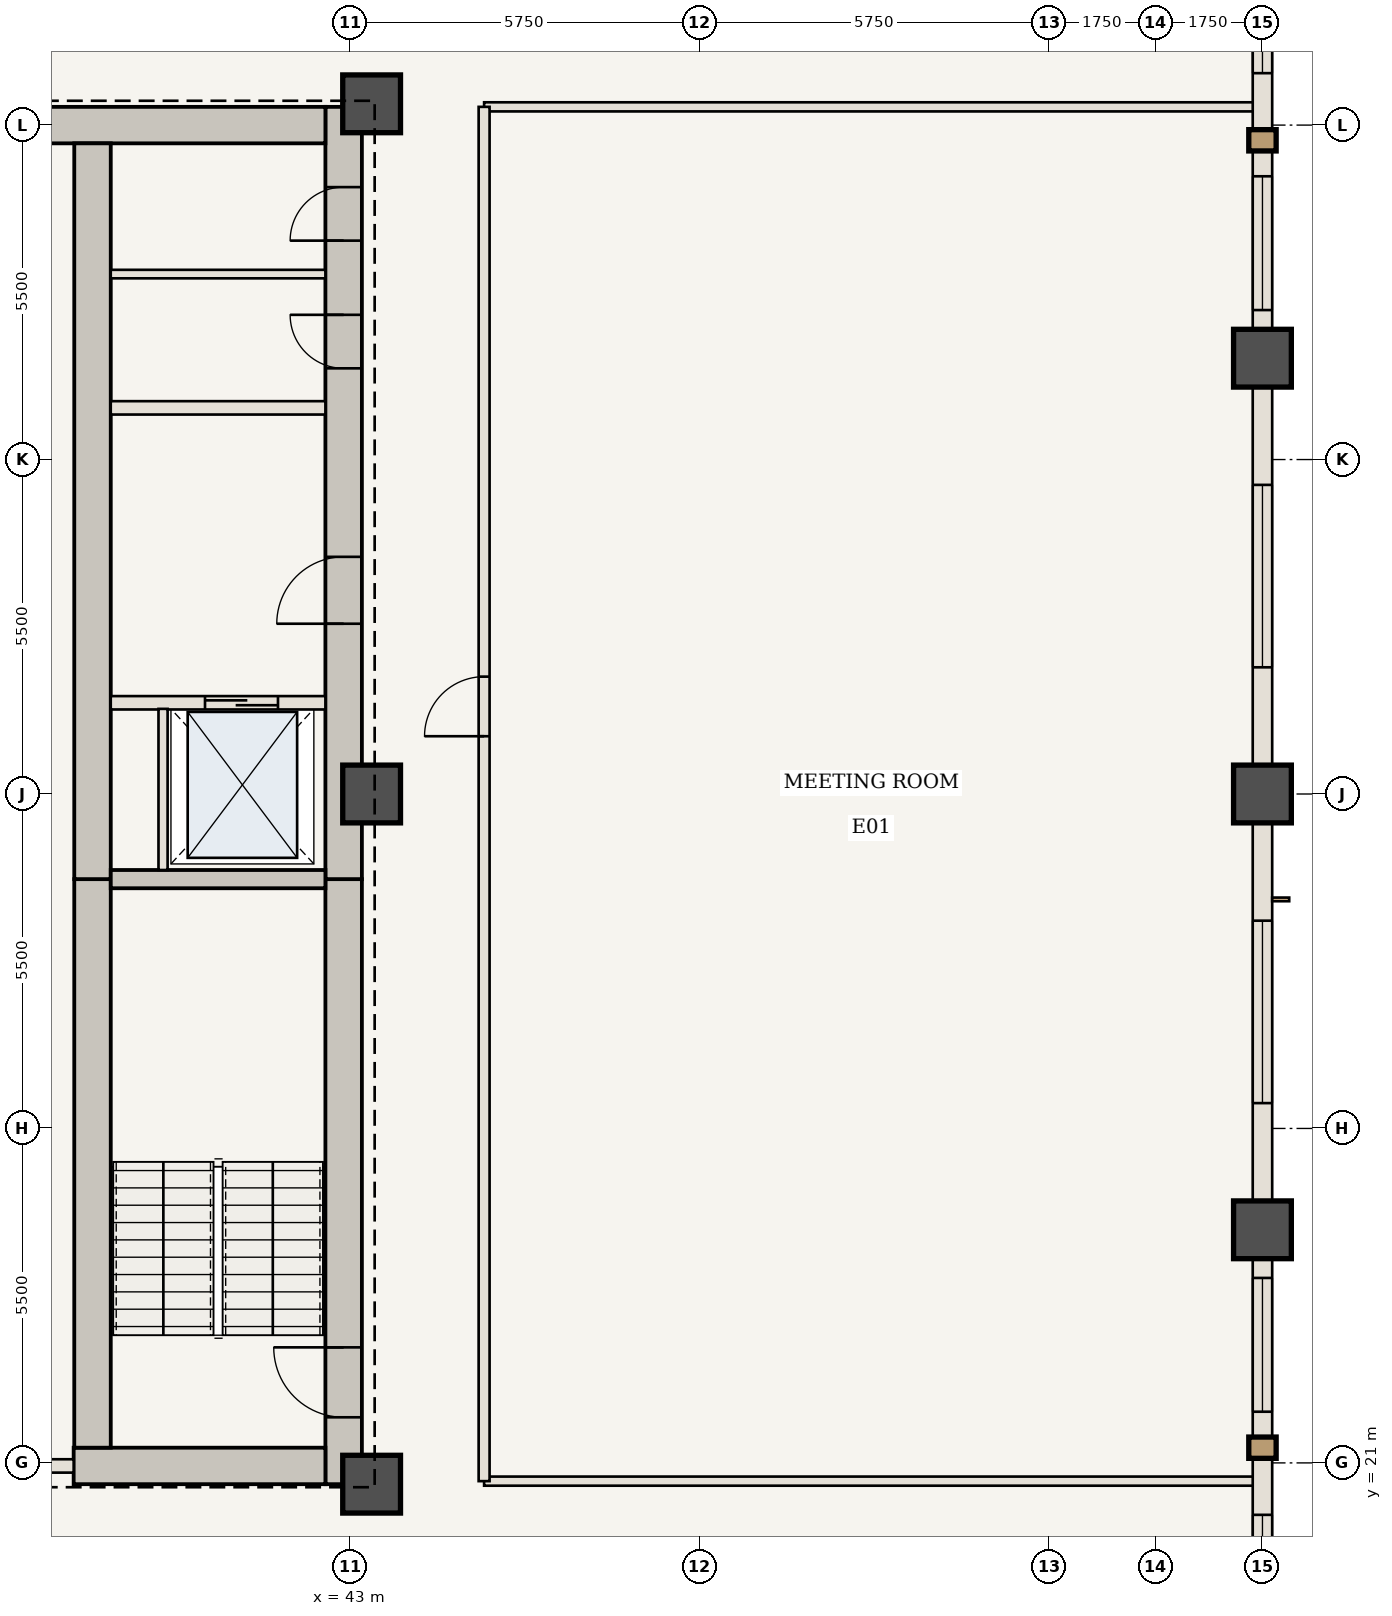
"""IFC4 building model, lengths in metres.
Left out: names, types, materials, properties, quantities, classifications, styles, units other than length and angle.
Written with IfcOpenShell. Run it as: python <this file> out.ifc"""

import sys

from ifc_helpers import new_model, si_unit, direction, frame, frame_2d, origin, origin_2d, place, context, subcontext, project, spatial, rectangle, extrude, element, fill, save


model = new_model("IFC4")
c1 = context("Model", 3, precision=1e-05, world=origin(), true_north=direction((0.0, 1.0)))
c2 = subcontext(c1, "Body", "Model", "MODEL_VIEW")
j1 = project(units=[si_unit("LENGTHUNIT", "METRE"), si_unit("PLANEANGLEUNIT", "RADIAN")], contexts=[c1])
p1 = place(None, origin())
s1 = spatial("IfcSite", under=j1, at=p1, CompositionType="ELEMENT")
p2 = place(p1, origin())
s2 = spatial("IfcBuilding", under=s1, at=p2, CompositionType="ELEMENT")
p3 = place(p2, frame((0.0, 0.0, 156.8)))
s3 = spatial("IfcBuildingStorey", under=s2, at=p3, CompositionType="ELEMENT", Elevation=156.8)
p4 = place(p3, frame((42.89, 20.65, 0.0), z_axis=(0.0, 0.0, 1.0), x_axis=(0.0, 1.0, 0.0)))
e1 = element("IfcWall", 1, at=p4, inside=s3, PredefinedType="SHEAR", context=c2, shape_type="SweptSolid", body=[
    extrude(rectangle(XDim=9.95, YDim=0.6, at=frame_2d((4.975, 0.0))), origin(), (0.0, 0.0, 1.0), 3.85),
])
p5 = place(p4, frame((1.1, 0.0, 0.0)))
e2 = element("IfcOpeningElement", 2, at=p5, cuts=e1, PredefinedType="OPENING", context=c2, shape_type="SweptSolid", body=[
    extrude(rectangle(XDim=1.15, YDim=2.15, at=frame_2d((0.575, 1.075))), frame((0.0, 0.31, 0.0), z_axis=(0.0, -1.0, 0.0), x_axis=(1.0, 0.0, 0.0)), (0.0, 0.0, 1.0), 0.62),
])
p6 = place(p3, frame((42.89, 30.6, 0.0), z_axis=(0.0, 0.0, 1.0), x_axis=(0.0, 1.0, 0.0)))
e3 = element("IfcWall", 3, at=p6, inside=s3, PredefinedType="SHEAR", context=c2, shape_type="SweptSolid", body=[
    extrude(rectangle(XDim=12.7, YDim=0.6, at=frame_2d((6.35, 0.0))), origin(), (0.0, 0.0, 1.0), 3.85),
])
p7 = place(p6, frame((4.2, 0.0, 0.0)))
e4 = element("IfcOpeningElement", 4, at=p7, cuts=e3, PredefinedType="OPENING", context=c2, shape_type="SweptSolid", body=[
    extrude(rectangle(XDim=1.1, YDim=2.15, at=frame_2d((0.55, 1.075))), frame((0.0, 0.31, 0.0), z_axis=(0.0, -1.0, 0.0), x_axis=(1.0, 0.0, 0.0)), (0.0, 0.0, 1.0), 0.62),
])
p8 = place(p6, frame((8.4, 0.0, 0.0)))
e5 = element("IfcOpeningElement", 5, at=p8, cuts=e3, PredefinedType="OPENING", context=c2, shape_type="SweptSolid", body=[
    extrude(rectangle(XDim=0.88, YDim=2.1, at=frame_2d((0.44, 1.05))), frame((0.0, 0.31, 0.0), z_axis=(0.0, -1.0, 0.0), x_axis=(1.0, 0.0, 0.0)), (0.0, 0.0, 1.0), 0.62),
])
p9 = place(p6, frame((10.5, 0.0, 0.0)))
e6 = element("IfcOpeningElement", 6, at=p9, cuts=e3, PredefinedType="OPENING", context=c2, shape_type="SweptSolid", body=[
    extrude(rectangle(XDim=0.88, YDim=2.1, at=frame_2d((0.44, 1.05))), frame((0.0, 0.31, 0.0), z_axis=(0.0, -1.0, 0.0), x_axis=(1.0, 0.0, 0.0)), (0.0, 0.0, 1.0), 0.62),
])
p10 = place(p3, frame((38.45, 20.95, 0.0), z_axis=(0.0, 0.0, 1.0), x_axis=(1.0, 0.0, 0.0)))
e7 = element("IfcWall", 7, at=p10, inside=s3, PredefinedType="SHEAR", context=c2, shape_type="SweptSolid", body=[
    extrude(rectangle(XDim=4.14, YDim=0.6, at=frame_2d((2.07, 0.0))), origin(), (0.0, 0.0, 1.0), 3.85),
])
p11 = place(p3, frame((37.75, 43.0, 0.0), z_axis=(0.0, 0.0, 1.0), x_axis=(1.0, 0.0, 0.0)))
e8 = element("IfcWall", 8, at=p11, inside=s3, PredefinedType="SHEAR", context=c2, shape_type="SweptSolid", body=[
    extrude(rectangle(XDim=4.84, YDim=0.6, at=frame_2d((2.42, 0.0))), origin(), (0.0, 0.0, 1.0), 3.85),
])
p12 = place(p3, frame((38.76, 21.25, 0.0), z_axis=(0.0, 0.0, 1.0), x_axis=(0.0, 1.0, 0.0)))
e9 = element("IfcWall", 9, at=p12, inside=s3, PredefinedType="SHEAR", context=c2, shape_type="SweptSolid", body=[
    extrude(rectangle(XDim=9.35, YDim=0.6, at=frame_2d((4.675, 0.0))), origin(), (0.0, 0.0, 1.0), 3.85),
])
p13 = place(p3, frame((38.76, 30.6, 0.0), z_axis=(0.0, 0.0, 1.0), x_axis=(0.0, 1.0, 0.0)))
e10 = element("IfcWall", 10, at=p13, inside=s3, PredefinedType="SHEAR", context=c2, shape_type="SweptSolid", body=[
    extrude(rectangle(XDim=12.1, YDim=0.6, at=frame_2d((6.05, 0.0))), origin(), (0.0, 0.0, 1.0), 3.85),
])
for number, where, z_axis, x_axis in (
    (11, (43.35, 20.65, 0.0), (0.0, 0.0, 1.0), (1.0, 0.0, 0.0)),
    (12, (43.35, 32.0, 0.0), (0.0, 0.0, 1.0), (1.0, 0.0, 0.0)),
    (13, (43.35, 43.35, 0.0), (0.0, 0.0, 1.0), (1.0, 0.0, 0.0)),
    (14, (58.0, 24.833, 0.0), (0.0, 0.0, 1.0), (1.0, 0.0, 0.0)),
    (15, (58.0, 32.0, 0.0), (0.0, 0.0, 1.0), (1.0, 0.0, 0.0)),
    (16, (58.0, 39.167, 0.0), (0.0, 0.0, 1.0), (1.0, 0.0, 0.0)),
):
    element("IfcColumn", number, at=place(p3, frame(where, z_axis=z_axis, x_axis=x_axis)), inside=s3, PredefinedType="COLUMN", context=c2, shape_type="SweptSolid", body=[
        extrude(rectangle(XDim=0.95, YDim=0.95, at=origin_2d()), origin(), (0.0, 0.0, 1.0), 3.85),
    ])
p14 = place(p3, frame((39.06, 30.6, 0.0), z_axis=(0.0, 0.0, 1.0), x_axis=(1.0, 0.0, 0.0)))
e17 = element("IfcWall", 17, at=p14, inside=s3, PredefinedType="SHEAR", context=c2, shape_type="SweptSolid", body=[
    extrude(rectangle(XDim=3.53, YDim=0.3, at=frame_2d((1.765, 0.0))), origin(), (0.0, 0.0, 1.0), 3.685),
])
p15 = place(p3, frame((39.06, 33.5, 0.0), z_axis=(0.0, 0.0, 1.0), x_axis=(1.0, 0.0, 0.0)))
e18 = element("IfcWall", 18, at=p15, inside=s3, PredefinedType="STANDARD", context=c2, shape_type="SweptSolid", body=[
    extrude(rectangle(XDim=3.53, YDim=0.22, at=frame_2d((1.765, 0.0))), origin(), (0.0, 0.0, 1.0), 3.685),
])
p16 = place(p15, frame((1.55, 0.0, 0.0)))
e19 = element("IfcOpeningElement", 19, at=p16, cuts=e18, PredefinedType="OPENING", context=c2, shape_type="SweptSolid", body=[
    extrude(rectangle(XDim=1.2, YDim=2.2, at=frame_2d((0.6, 1.1))), frame((0.0, 0.12, 0.0), z_axis=(0.0, -1.0, 0.0), x_axis=(1.0, 0.0, 0.0)), (0.0, 0.0, 1.0), 0.24),
])
p17 = place(p3, frame((39.92, 30.75, 0.0), z_axis=(0.0, 0.0, 1.0), x_axis=(0.0, 1.0, 0.0)))
e20 = element("IfcWall", 20, at=p17, inside=s3, PredefinedType="STANDARD", context=c2, shape_type="SweptSolid", body=[
    extrude(rectangle(XDim=2.65, YDim=0.15, at=frame_2d((1.325, 0.0))), origin(), (0.0, 0.0, 1.0), 3.685),
])
p18 = place(p3, frame((39.06, 38.35, 0.0), z_axis=(0.0, 0.0, 1.0), x_axis=(1.0, 0.0, 0.0)))
e21 = element("IfcWall", 21, at=p18, inside=s3, PredefinedType="STANDARD", context=c2, shape_type="SweptSolid", body=[
    extrude(rectangle(XDim=3.53, YDim=0.22, at=frame_2d((1.765, 0.0))), origin(), (0.0, 0.0, 1.0), 3.685),
])
p19 = place(p3, frame((39.06, 40.55, 0.0), z_axis=(0.0, 0.0, 1.0), x_axis=(1.0, 0.0, 0.0)))
e22 = element("IfcWall", 22, at=p19, inside=s3, PredefinedType="STANDARD", context=c2, shape_type="SweptSolid", body=[
    extrude(rectangle(XDim=3.53, YDim=0.14, at=frame_2d((1.765, 0.0))), origin(), (0.0, 0.0, 1.0), 3.685),
])
p20 = place(p3, frame((35.15, 20.95, 0.0), z_axis=(0.0, 0.0, 1.0), x_axis=(1.0, 0.0, 0.0)))
e23 = element("IfcWall", 23, at=p20, inside=s3, PredefinedType="STANDARD", context=c2, shape_type="SweptSolid", body=[
    extrude(rectangle(XDim=3.3, YDim=0.22, at=frame_2d((1.65, 0.0))), origin(), (0.0, 0.0, 1.0), 3.685),
])
p21 = place(p20, frame((1.1, 0.0, 0.0)))
e24 = element("IfcOpeningElement", 24, at=p21, cuts=e23, PredefinedType="OPENING", context=c2, shape_type="SweptSolid", body=[
    extrude(rectangle(XDim=1.1, YDim=2.15, at=frame_2d((0.55, 1.075))), frame((0.0, 0.12, 0.0), z_axis=(0.0, -1.0, 0.0), x_axis=(1.0, 0.0, 0.0)), (0.0, 0.0, 1.0), 0.24),
])
for number, where, z_axis, x_axis in (
    (25, (45.2, 20.7, 0.0), (0.0, 0.0, 1.0), (1.0, 0.0, 0.0)),
    (26, (45.2, 43.3, 0.0), (0.0, 0.0, 1.0), (1.0, 0.0, 0.0)),
):
    element("IfcWall", number, at=place(p3, frame(where, z_axis=z_axis, x_axis=x_axis)), inside=s3, PredefinedType="STANDARD", context=c2, shape_type="SweptSolid", body=[
        extrude(rectangle(XDim=12.74, YDim=0.15, at=frame_2d((6.37, 0.0))), origin(), (0.0, 0.0, 1.0), 3.065),
    ])
p22 = place(p3, frame((45.2, 20.7, 0.0), z_axis=(0.0, 0.0, 1.0), x_axis=(0.0, 1.0, 0.0)))
e27 = element("IfcWall", 27, at=p22, inside=s3, PredefinedType="STANDARD", context=c2, shape_type="SweptSolid", body=[
    extrude(rectangle(XDim=22.6, YDim=0.18, at=frame_2d((11.3, 0.0))), origin(), (0.0, 0.0, 1.0), 3.685),
])
p23 = place(p22, frame((12.25, 0.0, 0.0)))
e28 = element("IfcOpeningElement", 28, at=p23, cuts=e27, PredefinedType="OPENING", context=c2, shape_type="SweptSolid", body=[
    extrude(rectangle(XDim=0.98, YDim=2.2, at=frame_2d((0.49, 1.1))), frame((0.0, 0.1, 0.0), z_axis=(0.0, -1.0, 0.0), x_axis=(1.0, 0.0, 0.0)), (0.0, 0.0, 1.0), 0.2),
])
p24 = place(p3, frame((58.0, 24.833, 0.0), z_axis=(0.0, 0.0, 1.0), x_axis=(0.0, -1.0, 0.0)))
e29 = element("IfcWall", 29, at=p24, inside=s3, PredefinedType="USERDEFINED", context=c2, shape_type="SweptSolid", body=[
    extrude(rectangle(XDim=7.167, YDim=0.32, at=frame_2d((3.583, 0.0))), origin(), (0.0, 0.0, 1.0), 2.885),
])
p25 = place(p24, frame((0.792, 0.0, 0.85)))
e30 = element("IfcOpeningElement", 30, at=p25, cuts=e29, PredefinedType="OPENING", context=c2, shape_type="SweptSolid", body=[
    extrude(rectangle(XDim=2.2, YDim=1.835, at=frame_2d((1.1, 0.917))), frame((0.0, 0.17, 0.0), z_axis=(0.0, -1.0, 0.0), x_axis=(1.0, 0.0, 0.0)), (0.0, 0.0, 1.0), 0.34),
])
p26 = place(p24, frame((4.688, 0.0, 0.85)))
e31 = element("IfcOpeningElement", 31, at=p26, cuts=e29, PredefinedType="OPENING", context=c2, shape_type="SweptSolid", body=[
    extrude(rectangle(XDim=1.6, YDim=1.835, at=frame_2d((0.8, 0.917))), frame((0.0, 0.17, 0.0), z_axis=(0.0, -1.0, 0.0), x_axis=(1.0, 0.0, 0.0)), (0.0, 0.0, 1.0), 0.34),
])
p27 = place(p3, frame((58.0, 32.0, 0.0), z_axis=(0.0, 0.0, 1.0), x_axis=(0.0, -1.0, 0.0)))
e32 = element("IfcWall", 32, at=p27, inside=s3, PredefinedType="USERDEFINED", context=c2, shape_type="SweptSolid", body=[
    extrude(rectangle(XDim=7.167, YDim=0.32, at=frame_2d((3.583, 0.0))), origin(), (0.0, 0.0, 1.0), 2.885),
])
p28 = place(p27, frame((2.083, 0.0, 0.85)))
e33 = element("IfcOpeningElement", 33, at=p28, cuts=e32, PredefinedType="OPENING", context=c2, shape_type="SweptSolid", body=[
    extrude(rectangle(XDim=3.0, YDim=1.835, at=frame_2d((1.5, 0.917))), frame((0.0, 0.17, 0.0), z_axis=(0.0, -1.0, 0.0), x_axis=(1.0, 0.0, 0.0)), (0.0, 0.0, 1.0), 0.34),
])
p29 = place(p3, frame((58.0, 39.167, 0.0), z_axis=(0.0, 0.0, 1.0), x_axis=(0.0, -1.0, 0.0)))
e34 = element("IfcWall", 34, at=p29, inside=s3, PredefinedType="USERDEFINED", context=c2, shape_type="SweptSolid", body=[
    extrude(rectangle(XDim=7.167, YDim=0.32, at=frame_2d((3.583, 0.0))), origin(), (0.0, 0.0, 1.0), 2.885),
])
p30 = place(p29, frame((2.083, 0.0, 0.85)))
e35 = element("IfcOpeningElement", 35, at=p30, cuts=e34, PredefinedType="OPENING", context=c2, shape_type="SweptSolid", body=[
    extrude(rectangle(XDim=3.0, YDim=1.835, at=frame_2d((1.5, 0.917))), frame((0.0, 0.17, 0.0), z_axis=(0.0, -1.0, 0.0), x_axis=(1.0, 0.0, 0.0)), (0.0, 0.0, 1.0), 0.34),
])
p31 = place(p3, frame((58.0, 46.333, 0.0), z_axis=(0.0, 0.0, 1.0), x_axis=(0.0, -1.0, 0.0)))
e36 = element("IfcWall", 36, at=p31, inside=s3, PredefinedType="USERDEFINED", context=c2, shape_type="SweptSolid", body=[
    extrude(rectangle(XDim=7.167, YDim=0.32, at=frame_2d((3.583, 0.0))), origin(), (0.0, 0.0, 1.0), 2.885),
])
p32 = place(p31, frame((0.879, 0.0, 0.85)))
e37 = element("IfcOpeningElement", 37, at=p32, cuts=e36, PredefinedType="OPENING", context=c2, shape_type="SweptSolid", body=[
    extrude(rectangle(XDim=1.6, YDim=1.835, at=frame_2d((0.8, 0.917))), frame((0.0, 0.17, 0.0), z_axis=(0.0, -1.0, 0.0), x_axis=(1.0, 0.0, 0.0)), (0.0, 0.0, 1.0), 0.34),
])
p33 = place(p31, frame((4.175, 0.0, 0.85)))
e38 = element("IfcOpeningElement", 38, at=p33, cuts=e36, PredefinedType="OPENING", context=c2, shape_type="SweptSolid", body=[
    extrude(rectangle(XDim=2.2, YDim=1.835, at=frame_2d((1.1, 0.917))), frame((0.0, 0.17, 0.0), z_axis=(0.0, -1.0, 0.0), x_axis=(1.0, 0.0, 0.0)), (0.0, 0.0, 1.0), 0.34),
])
p34 = place(p5, origin())
e39 = element("IfcDoor", 39, at=p34, inside=s3, OperationType="SINGLE_SWING_RIGHT", PredefinedType="DOOR", context=c2, shape_type="SweptSolid", body=[
    extrude(rectangle(XDim=1.15, YDim=2.15, at=frame_2d((0.575, 1.075))), frame((0.0, 0.025, 0.0), z_axis=(0.0, -1.0, 0.0), x_axis=(1.0, 0.0, 0.0)), (0.0, 0.0, 1.0), 0.05),
])
fill(e2, e39)
p35 = place(p7, origin())
e40 = element("IfcDoor", 40, at=p35, inside=s3, OperationType="SINGLE_SWING_LEFT", PredefinedType="DOOR", context=c2, shape_type="SweptSolid", body=[
    extrude(rectangle(XDim=1.1, YDim=2.15, at=frame_2d((0.55, 1.075))), frame((0.0, 0.025, 0.0), z_axis=(0.0, -1.0, 0.0), x_axis=(1.0, 0.0, 0.0)), (0.0, 0.0, 1.0), 0.05),
])
fill(e4, e40)
p36 = place(p8, origin())
e41 = element("IfcDoor", 41, at=p36, inside=s3, OperationType="SINGLE_SWING_RIGHT", PredefinedType="DOOR", context=c2, shape_type="SweptSolid", body=[
    extrude(rectangle(XDim=0.88, YDim=2.1, at=frame_2d((0.44, 1.05))), frame((0.0, 0.025, 0.0), z_axis=(0.0, -1.0, 0.0), x_axis=(1.0, 0.0, 0.0)), (0.0, 0.0, 1.0), 0.05),
])
fill(e5, e41)
p37 = place(p9, origin())
e42 = element("IfcDoor", 42, at=p37, inside=s3, OperationType="SINGLE_SWING_LEFT", PredefinedType="DOOR", context=c2, shape_type="SweptSolid", body=[
    extrude(rectangle(XDim=0.88, YDim=2.1, at=frame_2d((0.44, 1.05))), frame((0.0, 0.025, 0.0), z_axis=(0.0, -1.0, 0.0), x_axis=(1.0, 0.0, 0.0)), (0.0, 0.0, 1.0), 0.05),
])
fill(e6, e42)
p38 = place(p16, origin())
e43 = element("IfcDoor", 43, at=p38, inside=s3, OperationType="DOUBLE_DOOR_SLIDING", PredefinedType="DOOR", context=c2, shape_type="SweptSolid", body=[
    extrude(rectangle(XDim=1.2, YDim=2.2, at=frame_2d((0.6, 1.1))), frame((0.0, 0.025, 0.0), z_axis=(0.0, -1.0, 0.0), x_axis=(1.0, 0.0, 0.0)), (0.0, 0.0, 1.0), 0.05),
])
fill(e19, e43)
p39 = place(p23, origin())
e44 = element("IfcDoor", 44, at=p39, inside=s3, OperationType="SINGLE_SWING_LEFT", PredefinedType="DOOR", context=c2, shape_type="SweptSolid", body=[
    extrude(rectangle(XDim=0.98, YDim=2.2, at=frame_2d((0.49, 1.1))), frame((0.0, 0.025, 0.0), z_axis=(0.0, -1.0, 0.0), x_axis=(1.0, 0.0, 0.0)), (0.0, 0.0, 1.0), 0.05),
])
fill(e28, e44)
p40 = place(p25, origin())
e45 = element("IfcWindow", 45, at=p40, inside=s3, PartitioningType="SINGLE_PANEL", PredefinedType="WINDOW", context=c2, shape_type="SweptSolid", body=[
    extrude(rectangle(XDim=2.2, YDim=1.835, at=frame_2d((1.1, 0.917))), frame((0.0, 0.03, 0.0), z_axis=(0.0, -1.0, 0.0), x_axis=(1.0, 0.0, 0.0)), (0.0, 0.0, 1.0), 0.06),
])
fill(e30, e45)
p41 = place(p26, origin())
e46 = element("IfcWindow", 46, at=p41, inside=s3, PartitioningType="SINGLE_PANEL", PredefinedType="WINDOW", context=c2, shape_type="SweptSolid", body=[
    extrude(rectangle(XDim=1.6, YDim=1.835, at=frame_2d((0.8, 0.917))), frame((0.0, 0.03, 0.0), z_axis=(0.0, -1.0, 0.0), x_axis=(1.0, 0.0, 0.0)), (0.0, 0.0, 1.0), 0.06),
])
fill(e31, e46)
p42 = place(p28, origin())
e47 = element("IfcWindow", 47, at=p42, inside=s3, PartitioningType="SINGLE_PANEL", PredefinedType="WINDOW", context=c2, shape_type="SweptSolid", body=[
    extrude(rectangle(XDim=3.0, YDim=1.835, at=frame_2d((1.5, 0.917))), frame((0.0, 0.03, 0.0), z_axis=(0.0, -1.0, 0.0), x_axis=(1.0, 0.0, 0.0)), (0.0, 0.0, 1.0), 0.06),
])
fill(e33, e47)
p43 = place(p30, origin())
e48 = element("IfcWindow", 48, at=p43, inside=s3, PartitioningType="SINGLE_PANEL", PredefinedType="WINDOW", context=c2, shape_type="SweptSolid", body=[
    extrude(rectangle(XDim=3.0, YDim=1.835, at=frame_2d((1.5, 0.917))), frame((0.0, 0.03, 0.0), z_axis=(0.0, -1.0, 0.0), x_axis=(1.0, 0.0, 0.0)), (0.0, 0.0, 1.0), 0.06),
])
fill(e35, e48)
p44 = place(p32, origin())
e49 = element("IfcWindow", 49, at=p44, inside=s3, PartitioningType="SINGLE_PANEL", PredefinedType="WINDOW", context=c2, shape_type="SweptSolid", body=[
    extrude(rectangle(XDim=1.6, YDim=1.835, at=frame_2d((0.8, 0.917))), frame((0.0, 0.03, 0.0), z_axis=(0.0, -1.0, 0.0), x_axis=(1.0, 0.0, 0.0)), (0.0, 0.0, 1.0), 0.06),
])
fill(e37, e49)
p45 = place(p33, origin())
e50 = element("IfcWindow", 50, at=p45, inside=s3, PartitioningType="SINGLE_PANEL", PredefinedType="WINDOW", context=c2, shape_type="SweptSolid", body=[
    extrude(rectangle(XDim=2.2, YDim=1.835, at=frame_2d((1.1, 0.917))), frame((0.0, 0.03, 0.0), z_axis=(0.0, -1.0, 0.0), x_axis=(1.0, 0.0, 0.0)), (0.0, 0.0, 1.0), 0.06),
])
fill(e38, e50)
save(model, sys.argv[1])
